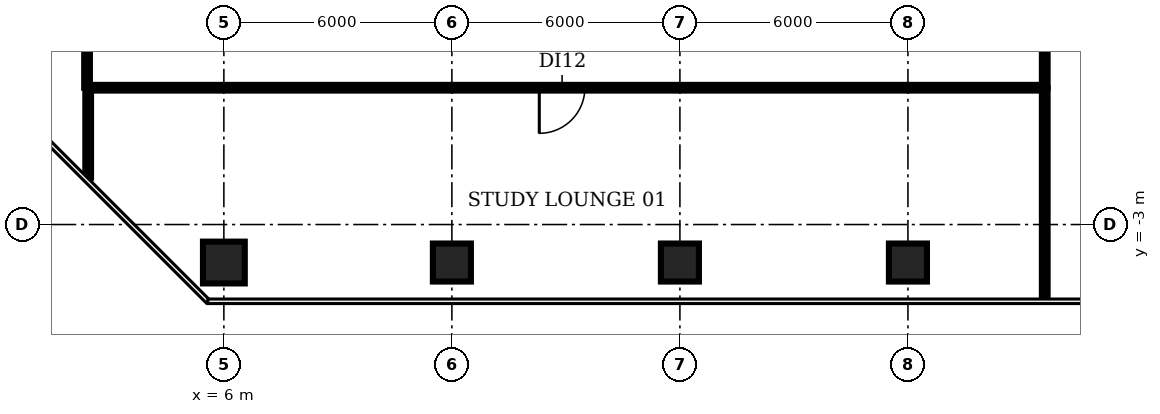
"""IFC4 building model, lengths in metres.
Left out: names, types, materials, properties, quantities, classifications, styles, units other than length and angle.
Written with IfcOpenShell. Run it as: python <this file> out.ifc"""

import sys

from ifc_helpers import new_model, si_unit, direction, frame, frame_2d, origin, origin_2d, place, context, subcontext, project, spatial, rectangle, circle, extrude, element, fill, save


model = new_model("IFC4")
c1 = context("Model", 3, precision=1e-05, world=origin(), true_north=direction((0.0, 1.0)))
c2 = subcontext(c1, "Body", "Model", "MODEL_VIEW")
j1 = project(units=[si_unit("LENGTHUNIT", "METRE"), si_unit("PLANEANGLEUNIT", "RADIAN")], contexts=[c1])
p1 = place(None, origin())
s1 = spatial("IfcSite", under=j1, at=p1, CompositionType="ELEMENT")
p2 = place(p1, origin())
s2 = spatial("IfcBuilding", under=s1, at=p2, CompositionType="ELEMENT")
p3 = place(p2, frame((0.0, 0.0, 15.5)))
s3 = spatial("IfcBuildingStorey", under=s2, at=p3, CompositionType="ELEMENT", Elevation=15.5)
p4 = place(p3, frame((6.0, -4.0, 0.0), z_axis=(0.0, 0.0, 1.0), x_axis=(1.0, 0.0, 0.0)))
e1 = element("IfcColumn", 1, at=p4, inside=s3, PredefinedType="COLUMN", context=c2, shape_type="SweptSolid", body=[
    extrude(circle(Radius=0.55, at=origin_2d()), origin(), (0.0, 0.0, 1.0), 4.15),
])
for number, where, z_axis, x_axis in (
    (2, (12.0, -4.0, 0.0), (0.0, 0.0, 1.0), (1.0, 0.0, 0.0)),
    (3, (18.0, -4.0, 0.0), (0.0, 0.0, 1.0), (1.0, 0.0, 0.0)),
    (4, (24.0, -4.0, 0.0), (0.0, 0.0, 1.0), (1.0, 0.0, 0.0)),
):
    element("IfcColumn", number, at=place(p3, frame(where, z_axis=z_axis, x_axis=x_axis)), inside=s3, PredefinedType="COLUMN", context=c2, shape_type="SweptSolid", body=[
        extrude(rectangle(XDim=1.0, YDim=1.0, at=origin_2d()), origin(), (0.0, 0.0, 1.0), 4.15),
    ])
p5 = place(p3, frame((2.4, 0.6, 0.0), z_axis=(0.0, 0.0, 1.0), x_axis=(0.0, 1.0, 0.0)))
e5 = element("IfcWall", 5, at=p5, inside=s3, PredefinedType="PARTITIONING", context=c2, shape_type="SweptSolid", body=[
    extrude(rectangle(XDim=3.9, YDim=0.15, at=frame_2d((1.95, 0.0))), origin(), (0.0, 0.0, 1.0), 3.08),
])
p6 = place(p3, frame((2.43, -1.77, 0.0), z_axis=(0.0, 0.0, 1.0), x_axis=(0.0, 1.0, 0.0)))
e6 = element("IfcWall", 6, at=p6, inside=s3, PredefinedType="PARTITIONING", context=c2, shape_type="SweptSolid", body=[
    extrude(rectangle(XDim=2.37, YDim=0.15, at=frame_2d((1.185, 0.0))), origin(), (0.0, 0.0, 1.0), 3.08),
])
p7 = place(p3, frame((27.6, -4.97, 0.0), z_axis=(0.0, 0.0, 1.0), x_axis=(0.0, 1.0, 0.0)))
e7 = element("IfcWall", 7, at=p7, inside=s3, PredefinedType="PARTITIONING", context=c2, shape_type="SweptSolid", body=[
    extrude(rectangle(XDim=5.57, YDim=0.15, at=frame_2d((2.785, 0.0))), origin(), (0.0, 0.0, 1.0), 3.08),
])
p8 = place(p3, frame((27.6, 0.6, 0.0), z_axis=(0.0, 0.0, 1.0), x_axis=(-1.0, 0.0, 0.0)))
e8 = element("IfcWall", 8, at=p8, inside=s3, PredefinedType="PARTITIONING", context=c2, shape_type="SweptSolid", body=[
    extrude(rectangle(XDim=25.2, YDim=0.15, at=frame_2d((12.6, 0.0))), origin(), (0.0, 0.0, 1.0), 3.08),
])
p9 = place(p8, frame((12.1, 0.0, 0.0)))
e9 = element("IfcOpeningElement", 9, at=p9, cuts=e8, PredefinedType="OPENING", context=c2, shape_type="SweptSolid", body=[
    extrude(rectangle(XDim=1.2, YDim=2.1, at=frame_2d((0.6, 1.05))), frame((0.0, 0.085, 0.0), z_axis=(0.0, -1.0, 0.0), x_axis=(1.0, 0.0, 0.0)), (0.0, 0.0, 1.0), 0.17),
])
p10 = place(p3, frame((27.6, 0.6, 0.0), z_axis=(0.0, 0.0, 1.0), x_axis=(0.0, 1.0, 0.0)))
e10 = element("IfcWall", 10, at=p10, inside=s3, PredefinedType="PARTITIONING", context=c2, shape_type="SweptSolid", body=[
    extrude(rectangle(XDim=3.9, YDim=0.15, at=frame_2d((1.95, 0.0))), origin(), (0.0, 0.0, 1.0), 3.08),
])
p11 = place(p9, origin())
e11 = element("IfcDoor", 11, at=p11, inside=s3, OperationType="SINGLE_SWING_RIGHT", PredefinedType="DOOR", context=c2, shape_type="SweptSolid", body=[
    extrude(rectangle(XDim=1.2, YDim=2.1, at=frame_2d((0.6, 1.05))), frame((0.0, 0.025, 0.0), z_axis=(0.0, -1.0, 0.0), x_axis=(1.0, 0.0, 0.0)), (0.0, 0.0, 1.0), 0.05),
])
fill(e9, e11)
save(model, sys.argv[1])
